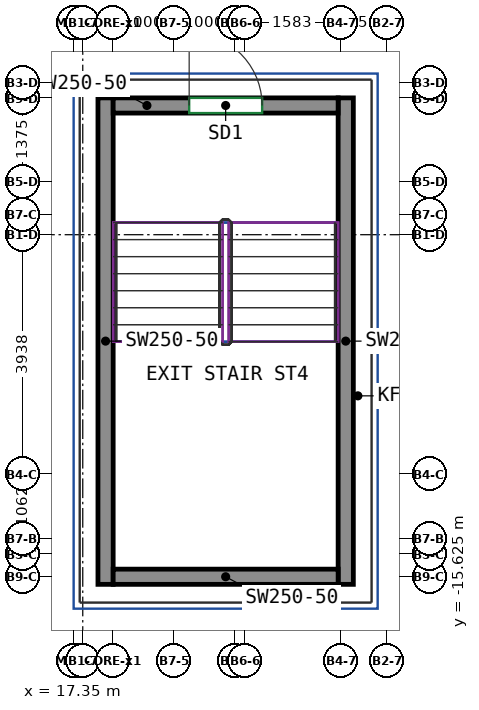
"""IFC4 building model, lengths in metres.
Left out: names, types, materials, properties, quantities, classifications, styles, units other than length and angle.
Written with IfcOpenShell. Run it as: python <this file> out.ifc"""

import sys

from ifc_helpers import new_model, si_unit, direction, frame, frame_2d, origin, place, context, subcontext, project, spatial, rectangle, extrude, source, transform, mapped, element, fill, save


model = new_model("IFC4")
c1 = context("Model", 3, precision=1e-05, world=origin(), true_north=direction((0.0, 1.0)))
c2 = subcontext(c1, "Body", "Model", "MODEL_VIEW")
j1 = project(units=[si_unit("LENGTHUNIT", "METRE"), si_unit("PLANEANGLEUNIT", "RADIAN")], contexts=[c1])
p1 = place(None, origin())
s1 = spatial("IfcSite", under=j1, at=p1, CompositionType="ELEMENT")
p2 = place(p1, origin())
s2 = spatial("IfcBuilding", under=s1, at=p2, CompositionType="ELEMENT")
p3 = place(p2, frame((0.0, 0.0, 323.8)))
s3 = spatial("IfcBuildingStorey", under=s2, at=p3, CompositionType="ELEMENT", Elevation=323.8)
m1 = source(origin(), c2, "Body", "SweptSolid", [
    extrude(rectangle(XDim=8.0, YDim=0.25, at=frame_2d((4.0, 0.0))), origin(), (0.0, 0.0, 1.0), 5.0),
])
for number, where, z_axis, x_axis in (
    (1, (17.875, -15.75, -0.4), (0.0, 0.0, 1.0), (0.0, 1.0, 0.0)),
    (2, (21.825, -15.75, -0.4), (0.0, 0.0, 1.0), (0.0, 1.0, 0.0)),
):
    element("IfcWall", number, at=place(p3, frame(where, z_axis=z_axis, x_axis=x_axis)), inside=s3, PredefinedType="SHEAR", context=c2, shape_type="MappedRepresentation", body=[
        mapped(m1, transform((0.0, 0.0, 0.0))),
    ])
m2 = source(origin(), c2, "Body", "SweptSolid", [
    extrude(rectangle(XDim=3.7, YDim=0.25, at=frame_2d((1.85, 0.0))), origin(), (0.0, 0.0, 1.0), 5.0),
])
p4 = place(p3, frame((18.0, -15.625, -0.4), z_axis=(0.0, 0.0, 1.0), x_axis=(1.0, 0.0, 0.0)))
e3 = element("IfcWall", 3, at=p4, inside=s3, PredefinedType="SHEAR", context=c2, shape_type="MappedRepresentation", body=[
    mapped(m2, transform((0.0, 0.0, 0.0))),
])
p5 = place(p3, frame((18.0, -7.875, -0.4), z_axis=(0.0, 0.0, 1.0), x_axis=(1.0, 0.0, 0.0)))
e4 = element("IfcWall", 4, at=p5, inside=s3, PredefinedType="SHEAR", context=c2, shape_type="MappedRepresentation", body=[
    mapped(m2, transform((0.0, 0.0, 0.0))),
])
p6 = place(p5, frame((1.25, 0.0, 0.4)))
e5 = element("IfcOpeningElement", 5, at=p6, cuts=e4, PredefinedType="OPENING", context=c2, shape_type="SweptSolid", body=[
    extrude(rectangle(XDim=1.2, YDim=2.1, at=frame_2d((0.6, 1.05))), frame((0.0, 0.135, 0.0), z_axis=(0.0, -1.0, 0.0), x_axis=(1.0, 0.0, 0.0)), (0.0, 0.0, 1.0), 0.27),
])
p7 = place(p6, origin())
e6 = element("IfcDoor", 6, at=p7, inside=s3, OperationType="DOUBLE_DOOR_SINGLE_SWING", PredefinedType="DOOR", context=c2, shape_type="SweptSolid", body=[
    extrude(rectangle(XDim=1.2, YDim=2.1, at=frame_2d((0.6, 1.05))), frame((0.0, 0.025, 0.0), z_axis=(0.0, -1.0, 0.0), x_axis=(1.0, 0.0, 0.0)), (0.0, 0.0, 1.0), 0.05),
])
fill(e5, e6)
save(model, sys.argv[1])
